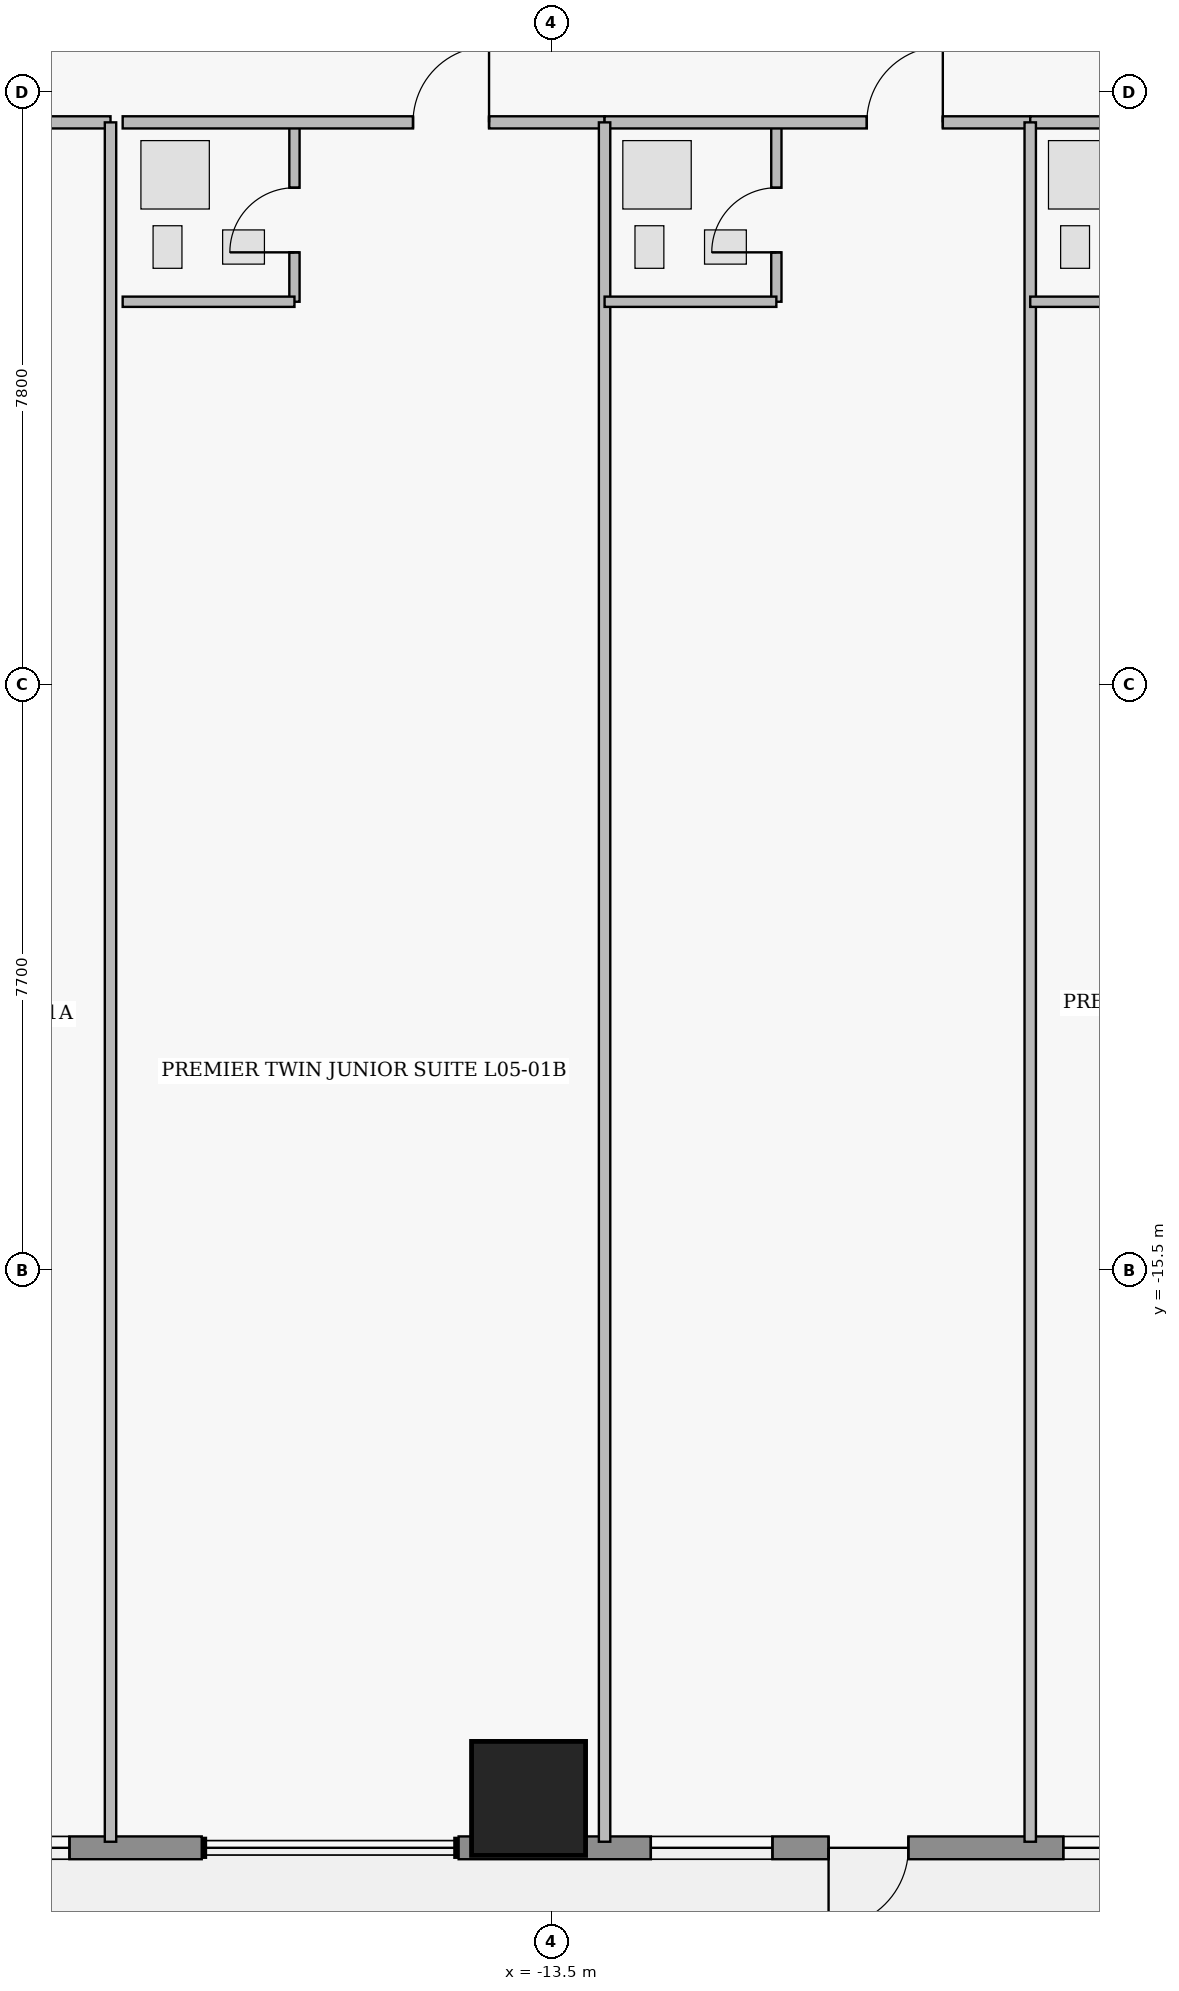
"""IFC4 building model, lengths in metres.
Left out: names, types, materials, properties, quantities, classifications, styles, units other than length and angle.
Written with IfcOpenShell. Run it as: python <this file> out.ifc"""

import sys

from ifc_helpers import new_model, si_unit, direction, frame, frame_2d, origin, origin_2d, place, context, subcontext, project, spatial, rectangle, extrude, element, fill, save


model = new_model("IFC4")
c1 = context("Model", 3, precision=1e-05, world=origin(), true_north=direction((0.0, 1.0)))
c2 = subcontext(c1, "Body", "Model", "MODEL_VIEW")
j1 = project(units=[si_unit("LENGTHUNIT", "METRE"), si_unit("PLANEANGLEUNIT", "RADIAN")], contexts=[c1])
p1 = place(None, origin())
s1 = spatial("IfcSite", under=j1, at=p1, CompositionType="ELEMENT")
p2 = place(p1, origin())
s2 = spatial("IfcBuilding", under=s1, at=p2, CompositionType="ELEMENT")
p3 = place(p2, frame((0.0, 0.0, 27.6)))
s3 = spatial("IfcBuildingStorey", under=s2, at=p3, CompositionType="ELEMENT", Elevation=27.6)
p4 = place(p3, frame((-13.8, -22.45, 0.0), z_axis=(0.0, 0.0, 1.0), x_axis=(1.0, 0.0, 0.0)))
e1 = element("IfcColumn", 1, at=p4, inside=s3, PredefinedType="COLUMN", context=c2, shape_type="SweptSolid", body=[
    extrude(rectangle(XDim=1.5, YDim=1.5, at=origin_2d()), origin(), (0.0, 0.0, 1.0), 3.65),
])
p5 = place(p3, frame((-0.75, -23.1, 0.0), z_axis=(0.0, 0.0, 1.0), x_axis=(-1.0, 0.0, 0.0)))
e2 = element("IfcWall", 2, at=p5, inside=s3, PredefinedType="STANDARD", context=c2, shape_type="SweptSolid", body=[
    extrude(rectangle(XDim=13.97, YDim=0.3, at=frame_2d((6.985, 0.0))), origin(), (0.0, 0.0, 1.0), 3.43),
])
p6 = place(p5, frame((8.053, 0.0, 0.0)))
e3 = element("IfcOpeningElement", 3, at=p6, cuts=e2, PredefinedType="OPENING", context=c2, shape_type="SweptSolid", body=[
    extrude(rectangle(XDim=1.05, YDim=2.2, at=frame_2d((0.525, 1.1))), frame((0.0, 0.16, 0.0), z_axis=(0.0, -1.0, 0.0), x_axis=(1.0, 0.0, 0.0)), (0.0, 0.0, 1.0), 0.32),
])
p7 = place(p5, frame((1.06, 0.0, 0.85)))
e4 = element("IfcOpeningElement", 4, at=p7, cuts=e2, PredefinedType="OPENING", context=c2, shape_type="SweptSolid", body=[
    extrude(rectangle(XDim=1.6, YDim=1.8, at=frame_2d((0.8, 0.9))), frame((0.0, 0.16, 0.0), z_axis=(0.0, -1.0, 0.0), x_axis=(1.0, 0.0, 0.0)), (0.0, 0.0, 1.0), 0.32),
])
p8 = place(p5, frame((4.865, 0.0, 0.95)))
e5 = element("IfcOpeningElement", 5, at=p8, cuts=e2, PredefinedType="OPENING", context=c2, shape_type="SweptSolid", body=[
    extrude(rectangle(XDim=1.15, YDim=1.55, at=frame_2d((0.575, 0.775))), frame((0.0, 0.16, 0.0), z_axis=(0.0, -1.0, 0.0), x_axis=(1.0, 0.0, 0.0)), (0.0, 0.0, 1.0), 0.32),
])
p9 = place(p5, frame((9.842, 0.0, 0.85)))
e6 = element("IfcOpeningElement", 6, at=p9, cuts=e2, PredefinedType="OPENING", context=c2, shape_type="SweptSolid", body=[
    extrude(rectangle(XDim=1.6, YDim=1.8, at=frame_2d((0.8, 0.9))), frame((0.0, 0.16, 0.0), z_axis=(0.0, -1.0, 0.0), x_axis=(1.0, 0.0, 0.0)), (0.0, 0.0, 1.0), 0.32),
])
p10 = place(p3, frame((-18.1, -23.1, 0.0), z_axis=(0.0, 0.0, 1.0), x_axis=(-1.0, 0.0, 0.0)))
e7 = element("IfcWall", 7, at=p10, inside=s3, PredefinedType="STANDARD", context=c2, shape_type="SweptSolid", body=[
    extrude(rectangle(XDim=4.0, YDim=0.3, at=frame_2d((2.0, 0.0))), origin(), (0.0, 0.0, 1.0), 3.43),
])
p11 = place(p10, frame((1.74, 0.0, 0.85)))
e8 = element("IfcOpeningElement", 8, at=p11, cuts=e7, PredefinedType="OPENING", context=c2, shape_type="SweptSolid", body=[
    extrude(rectangle(XDim=1.6, YDim=1.8, at=frame_2d((0.8, 0.9))), frame((0.0, 0.16, 0.0), z_axis=(0.0, -1.0, 0.0), x_axis=(1.0, 0.0, 0.0)), (0.0, 0.0, 1.0), 0.32),
])
p12 = place(p3, frame((-25.64, -0.4, 0.0), z_axis=(0.0, 0.0, 1.0), x_axis=(1.0, 0.0, 0.0)))
e9 = element("IfcWall", 9, at=p12, inside=s3, PredefinedType="PARTITIONING", context=c2, shape_type="SweptSolid", body=[
    extrude(rectangle(XDim=6.34, YDim=0.16, at=frame_2d((3.17, 0.0))), origin(), (0.0, 0.0, 1.0), 3.43),
])
p13 = place(p12, frame((3.82, 0.0, 0.0)))
e10 = element("IfcOpeningElement", 10, at=p13, cuts=e9, PredefinedType="OPENING", context=c2, shape_type="SweptSolid", body=[
    extrude(rectangle(XDim=1.0, YDim=2.15, at=frame_2d((0.5, 1.075))), frame((0.0, 0.09, 0.0), z_axis=(0.0, -1.0, 0.0), x_axis=(1.0, 0.0, 0.0)), (0.0, 0.0, 1.0), 0.18),
])
p14 = place(p3, frame((-16.88, -2.76, 0.0), z_axis=(0.0, 0.0, 1.0), x_axis=(0.0, 1.0, 0.0)))
e11 = element("IfcWall", 11, at=p14, inside=s3, PredefinedType="PLUMBINGWALL", context=c2, shape_type="SweptSolid", body=[
    extrude(rectangle(XDim=2.36, YDim=0.135, at=frame_2d((1.18, 0.0))), origin(), (0.0, 0.0, 1.0), 3.43),
])
p15 = place(p14, frame((0.65, 0.0, 0.0)))
e12 = element("IfcOpeningElement", 12, at=p15, cuts=e11, PredefinedType="OPENING", context=c2, shape_type="SweptSolid", body=[
    extrude(rectangle(XDim=0.85, YDim=2.1, at=frame_2d((0.425, 1.05))), frame((0.0, 0.077, 0.0), z_axis=(0.0, -1.0, 0.0), x_axis=(1.0, 0.0, 0.0)), (0.0, 0.0, 1.0), 0.155),
])
p16 = place(p3, frame((-19.14, -0.4, 0.0), z_axis=(0.0, 0.0, 1.0), x_axis=(1.0, 0.0, 0.0)))
e13 = element("IfcWall", 13, at=p16, inside=s3, PredefinedType="PARTITIONING", context=c2, shape_type="SweptSolid", body=[
    extrude(rectangle(XDim=6.34, YDim=0.16, at=frame_2d((3.17, 0.0))), origin(), (0.0, 0.0, 1.0), 3.43),
])
p17 = place(p16, frame((3.82, 0.0, 0.0)))
e14 = element("IfcOpeningElement", 14, at=p17, cuts=e13, PredefinedType="OPENING", context=c2, shape_type="SweptSolid", body=[
    extrude(rectangle(XDim=1.0, YDim=2.15, at=frame_2d((0.5, 1.075))), frame((0.0, 0.09, 0.0), z_axis=(0.0, -1.0, 0.0), x_axis=(1.0, 0.0, 0.0)), (0.0, 0.0, 1.0), 0.18),
])
p18 = place(p3, frame((-10.54, -2.76, 0.0), z_axis=(0.0, 0.0, 1.0), x_axis=(0.0, 1.0, 0.0)))
e15 = element("IfcWall", 15, at=p18, inside=s3, PredefinedType="PLUMBINGWALL", context=c2, shape_type="SweptSolid", body=[
    extrude(rectangle(XDim=2.36, YDim=0.135, at=frame_2d((1.18, 0.0))), origin(), (0.0, 0.0, 1.0), 3.43),
])
p19 = place(p18, frame((0.65, 0.0, 0.0)))
e16 = element("IfcOpeningElement", 16, at=p19, cuts=e15, PredefinedType="OPENING", context=c2, shape_type="SweptSolid", body=[
    extrude(rectangle(XDim=0.85, YDim=2.1, at=frame_2d((0.425, 1.05))), frame((0.0, 0.077, 0.0), z_axis=(0.0, -1.0, 0.0), x_axis=(1.0, 0.0, 0.0)), (0.0, 0.0, 1.0), 0.155),
])
p20 = place(p3, frame((-12.8, -0.4, 0.0), z_axis=(0.0, 0.0, 1.0), x_axis=(1.0, 0.0, 0.0)))
e17 = element("IfcWall", 17, at=p20, inside=s3, PredefinedType="PARTITIONING", context=c2, shape_type="SweptSolid", body=[
    extrude(rectangle(XDim=5.6, YDim=0.16, at=frame_2d((2.8, 0.0))), origin(), (0.0, 0.0, 1.0), 3.43),
])
p21 = place(p20, frame((3.45, 0.0, 0.0)))
e18 = element("IfcOpeningElement", 18, at=p21, cuts=e17, PredefinedType="OPENING", context=c2, shape_type="SweptSolid", body=[
    extrude(rectangle(XDim=1.0, YDim=2.15, at=frame_2d((0.5, 1.075))), frame((0.0, 0.09, 0.0), z_axis=(0.0, -1.0, 0.0), x_axis=(1.0, 0.0, 0.0)), (0.0, 0.0, 1.0), 0.18),
])
p22 = place(p3, frame((-7.2, -0.4, 0.0), z_axis=(0.0, 0.0, 1.0), x_axis=(1.0, 0.0, 0.0)))
e19 = element("IfcWall", 19, at=p22, inside=s3, PredefinedType="PARTITIONING", context=c2, shape_type="SweptSolid", body=[
    extrude(rectangle(XDim=6.0, YDim=0.16, at=frame_2d((3.0, 0.0))), origin(), (0.0, 0.0, 1.0), 3.43),
])
p23 = place(p22, frame((3.65, 0.0, 0.0)))
e20 = element("IfcOpeningElement", 20, at=p23, cuts=e19, PredefinedType="OPENING", context=c2, shape_type="SweptSolid", body=[
    extrude(rectangle(XDim=1.0, YDim=2.15, at=frame_2d((0.5, 1.075))), frame((0.0, 0.09, 0.0), z_axis=(0.0, -1.0, 0.0), x_axis=(1.0, 0.0, 0.0)), (0.0, 0.0, 1.0), 0.18),
])
p24 = place(p3, frame((-19.3, -23.02, 0.0), z_axis=(0.0, 0.0, 1.0), x_axis=(0.0, 1.0, 0.0)))
e21 = element("IfcWall", 21, at=p24, inside=s3, PredefinedType="PARTITIONING", context=c2, shape_type="SweptSolid", body=[
    extrude(rectangle(XDim=22.62, YDim=0.15, at=frame_2d((11.31, 0.0))), origin(), (0.0, 0.0, 1.0), 3.43),
])
p25 = place(p3, frame((-19.14, -2.76, 0.0), z_axis=(0.0, 0.0, 1.0), x_axis=(1.0, 0.0, 0.0)))
e22 = element("IfcWall", 22, at=p25, inside=s3, PredefinedType="PLUMBINGWALL", context=c2, shape_type="SweptSolid", body=[
    extrude(rectangle(XDim=2.26, YDim=0.135, at=frame_2d((1.13, 0.0))), origin(), (0.0, 0.0, 1.0), 3.43),
])
p26 = place(p3, frame((-12.8, -23.02, 0.0), z_axis=(0.0, 0.0, 1.0), x_axis=(0.0, 1.0, 0.0)))
e23 = element("IfcWall", 23, at=p26, inside=s3, PredefinedType="PARTITIONING", context=c2, shape_type="SweptSolid", body=[
    extrude(rectangle(XDim=22.62, YDim=0.15, at=frame_2d((11.31, 0.0))), origin(), (0.0, 0.0, 1.0), 3.43),
])
p27 = place(p3, frame((-12.8, -2.76, 0.0), z_axis=(0.0, 0.0, 1.0), x_axis=(1.0, 0.0, 0.0)))
e24 = element("IfcWall", 24, at=p27, inside=s3, PredefinedType="PLUMBINGWALL", context=c2, shape_type="SweptSolid", body=[
    extrude(rectangle(XDim=2.26, YDim=0.135, at=frame_2d((1.13, 0.0))), origin(), (0.0, 0.0, 1.0), 3.43),
])
p28 = place(p3, frame((-7.2, -23.02, 0.0), z_axis=(0.0, 0.0, 1.0), x_axis=(0.0, 1.0, 0.0)))
e25 = element("IfcWall", 25, at=p28, inside=s3, PredefinedType="PARTITIONING", context=c2, shape_type="SweptSolid", body=[
    extrude(rectangle(XDim=22.62, YDim=0.15, at=frame_2d((11.31, 0.0))), origin(), (0.0, 0.0, 1.0), 3.43),
])
p29 = place(p3, frame((-7.2, -2.76, 0.0), z_axis=(0.0, 0.0, 1.0), x_axis=(1.0, 0.0, 0.0)))
e26 = element("IfcWall", 26, at=p29, inside=s3, PredefinedType="PLUMBINGWALL", context=c2, shape_type="SweptSolid", body=[
    extrude(rectangle(XDim=2.26, YDim=0.135, at=frame_2d((1.13, 0.0))), origin(), (0.0, 0.0, 1.0), 3.43),
])
p30 = place(p6, origin())
e27 = element("IfcDoor", 27, at=p30, inside=s3, OperationType="SINGLE_SWING_RIGHT", PredefinedType="DOOR", context=c2, shape_type="SweptSolid", body=[
    extrude(rectangle(XDim=1.05, YDim=2.2, at=frame_2d((0.525, 1.1))), frame((0.0, 0.025, 0.0), z_axis=(0.0, -1.0, 0.0), x_axis=(1.0, 0.0, 0.0)), (0.0, 0.0, 1.0), 0.05),
])
fill(e3, e27)
p31 = place(p8, origin())
e28 = element("IfcWindow", 28, at=p31, inside=s3, PartitioningType="SINGLE_PANEL", PredefinedType="WINDOW", context=c2, shape_type="SweptSolid", body=[
    extrude(rectangle(XDim=1.15, YDim=1.55, at=frame_2d((0.575, 0.775))), frame((0.0, 0.03, 0.0), z_axis=(0.0, -1.0, 0.0), x_axis=(1.0, 0.0, 0.0)), (0.0, 0.0, 1.0), 0.06),
])
fill(e5, e28)
p32 = place(p9, origin())
e29 = element("IfcWindow", 29, at=p32, inside=s3, PartitioningType="SINGLE_PANEL", PredefinedType="WINDOW", context=c2, shape_type="SweptSolid", body=[
    extrude(rectangle(XDim=1.6, YDim=1.8, at=frame_2d((0.8, 0.9))), frame((0.0, 0.03, 0.0), z_axis=(0.0, -1.0, 0.0), x_axis=(1.0, 0.0, 0.0)), (0.0, 0.0, 1.0), 0.06),
])
fill(e6, e29)
p33 = place(p11, origin())
e30 = element("IfcWindow", 30, at=p33, inside=s3, PartitioningType="SINGLE_PANEL", PredefinedType="WINDOW", context=c2, shape_type="SweptSolid", body=[
    extrude(rectangle(XDim=1.6, YDim=1.8, at=frame_2d((0.8, 0.9))), frame((0.0, 0.03, 0.0), z_axis=(0.0, -1.0, 0.0), x_axis=(1.0, 0.0, 0.0)), (0.0, 0.0, 1.0), 0.06),
])
fill(e8, e30)
p34 = place(p15, origin())
e31 = element("IfcDoor", 31, at=p34, inside=s3, OperationType="SINGLE_SWING_LEFT", PredefinedType="DOOR", context=c2, shape_type="SweptSolid", body=[
    extrude(rectangle(XDim=0.85, YDim=2.1, at=frame_2d((0.425, 1.05))), frame((0.0, 0.025, 0.0), z_axis=(0.0, -1.0, 0.0), x_axis=(1.0, 0.0, 0.0)), (0.0, 0.0, 1.0), 0.05),
])
fill(e12, e31)
p35 = place(p17, origin())
e32 = element("IfcDoor", 32, at=p35, inside=s3, OperationType="SINGLE_SWING_RIGHT", PredefinedType="DOOR", context=c2, shape_type="SweptSolid", body=[
    extrude(rectangle(XDim=1.0, YDim=2.15, at=frame_2d((0.5, 1.075))), frame((0.0, 0.025, 0.0), z_axis=(0.0, -1.0, 0.0), x_axis=(1.0, 0.0, 0.0)), (0.0, 0.0, 1.0), 0.05),
])
fill(e14, e32)
p36 = place(p19, origin())
e33 = element("IfcDoor", 33, at=p36, inside=s3, OperationType="SINGLE_SWING_LEFT", PredefinedType="DOOR", context=c2, shape_type="SweptSolid", body=[
    extrude(rectangle(XDim=0.85, YDim=2.1, at=frame_2d((0.425, 1.05))), frame((0.0, 0.025, 0.0), z_axis=(0.0, -1.0, 0.0), x_axis=(1.0, 0.0, 0.0)), (0.0, 0.0, 1.0), 0.05),
])
fill(e16, e33)
p37 = place(p21, origin())
e34 = element("IfcDoor", 34, at=p37, inside=s3, OperationType="SINGLE_SWING_RIGHT", PredefinedType="DOOR", context=c2, shape_type="SweptSolid", body=[
    extrude(rectangle(XDim=1.0, YDim=2.15, at=frame_2d((0.5, 1.075))), frame((0.0, 0.025, 0.0), z_axis=(0.0, -1.0, 0.0), x_axis=(1.0, 0.0, 0.0)), (0.0, 0.0, 1.0), 0.05),
])
fill(e18, e34)
save(model, sys.argv[1])
